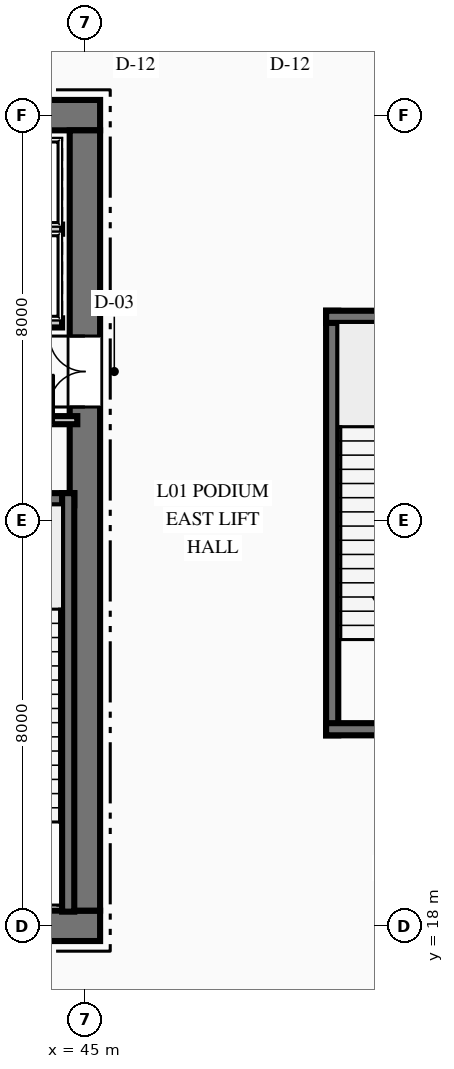
"""IFC4 building model, lengths in metres.
Left out: names, types, materials, properties, quantities, classifications, styles, units other than length and angle.
Written with IfcOpenShell. Run it as: python <this file> out.ifc"""

import sys

from ifc_helpers import new_model, si_unit, direction, frame, frame_2d, origin, place, context, subcontext, project, spatial, rectangle, extrude, element, fill, save


model = new_model("IFC4")
c1 = context("Model", 3, precision=1e-05, world=origin(), true_north=direction((0.0, 1.0)))
c2 = subcontext(c1, "Body", "Model", "MODEL_VIEW")
j1 = project(units=[si_unit("LENGTHUNIT", "METRE"), si_unit("PLANEANGLEUNIT", "RADIAN")], contexts=[c1])
p1 = place(None, origin())
s1 = spatial("IfcSite", under=j1, at=p1, CompositionType="ELEMENT")
p2 = place(p1, origin())
s2 = spatial("IfcBuilding", under=s1, at=p2, CompositionType="ELEMENT")
p3 = place(p2, frame((0.0, 0.0, 6.0)))
s3 = spatial("IfcBuildingStorey", under=s2, at=p3, CompositionType="ELEMENT", Elevation=6.0)
p4 = place(p3, frame((26.7, 18.0, 0.0), z_axis=(0.0, 0.0, 1.0), x_axis=(1.0, 0.0, 0.0)))
e1 = element("IfcWall", 1, at=p4, inside=s3, PredefinedType="SHEAR", context=c2, shape_type="SweptSolid", body=[
    extrude(rectangle(XDim=18.6, YDim=0.6, at=frame_2d((9.3, 0.0))), origin(), (0.0, 0.0, 1.0), 5.4),
])
p5 = place(p4, frame((7.4, 0.0, 0.0)))
e2 = element("IfcOpeningElement", 2, at=p5, cuts=e1, PredefinedType="OPENING", context=c2, shape_type="SweptSolid", body=[
    extrude(rectangle(XDim=1.1, YDim=2.15, at=frame_2d((0.55, 1.075))), frame((0.0, 0.31, 0.0), z_axis=(0.0, -1.0, 0.0), x_axis=(1.0, 0.0, 0.0)), (0.0, 0.0, 1.0), 0.62),
])
p6 = place(p4, frame((10.1, 0.0, 0.0)))
e3 = element("IfcOpeningElement", 3, at=p6, cuts=e1, PredefinedType="OPENING", context=c2, shape_type="SweptSolid", body=[
    extrude(rectangle(XDim=1.1, YDim=2.15, at=frame_2d((0.55, 1.075))), frame((0.0, 0.31, 0.0), z_axis=(0.0, -1.0, 0.0), x_axis=(1.0, 0.0, 0.0)), (0.0, 0.0, 1.0), 0.62),
])
p7 = place(p3, frame((26.7, 34.0, 0.0), z_axis=(0.0, 0.0, 1.0), x_axis=(1.0, 0.0, 0.0)))
e4 = element("IfcWall", 4, at=p7, inside=s3, PredefinedType="SHEAR", context=c2, shape_type="SweptSolid", body=[
    extrude(rectangle(XDim=18.6, YDim=0.6, at=frame_2d((9.3, 0.0))), origin(), (0.0, 0.0, 1.0), 5.4),
])
p8 = place(p7, frame((1.265, 0.0, 0.0)))
e5 = element("IfcOpeningElement", 5, at=p8, cuts=e4, PredefinedType="OPENING", context=c2, shape_type="SweptSolid", body=[
    extrude(rectangle(XDim=1.1, YDim=2.15, at=frame_2d((0.55, 1.075))), frame((0.0, 0.31, 0.0), z_axis=(0.0, -1.0, 0.0), x_axis=(1.0, 0.0, 0.0)), (0.0, 0.0, 1.0), 0.62),
])
p9 = place(p7, frame((3.515, 0.0, 0.0)))
e6 = element("IfcOpeningElement", 6, at=p9, cuts=e4, PredefinedType="OPENING", context=c2, shape_type="SweptSolid", body=[
    extrude(rectangle(XDim=1.1, YDim=2.15, at=frame_2d((0.55, 1.075))), frame((0.0, 0.31, 0.0), z_axis=(0.0, -1.0, 0.0), x_axis=(1.0, 0.0, 0.0)), (0.0, 0.0, 1.0), 0.62),
])
p10 = place(p7, frame((13.985, 0.0, 0.0)))
e7 = element("IfcOpeningElement", 7, at=p10, cuts=e4, PredefinedType="OPENING", context=c2, shape_type="SweptSolid", body=[
    extrude(rectangle(XDim=1.1, YDim=2.15, at=frame_2d((0.55, 1.075))), frame((0.0, 0.31, 0.0), z_axis=(0.0, -1.0, 0.0), x_axis=(1.0, 0.0, 0.0)), (0.0, 0.0, 1.0), 0.62),
])
p11 = place(p7, frame((16.235, 0.0, 0.0)))
e8 = element("IfcOpeningElement", 8, at=p11, cuts=e4, PredefinedType="OPENING", context=c2, shape_type="SweptSolid", body=[
    extrude(rectangle(XDim=1.1, YDim=2.15, at=frame_2d((0.55, 1.075))), frame((0.0, 0.31, 0.0), z_axis=(0.0, -1.0, 0.0), x_axis=(1.0, 0.0, 0.0)), (0.0, 0.0, 1.0), 0.62),
])
p12 = place(p3, frame((45.0, 18.3, 0.0), z_axis=(0.0, 0.0, 1.0), x_axis=(0.0, 1.0, 0.0)))
e9 = element("IfcWall", 9, at=p12, inside=s3, PredefinedType="SHEAR", context=c2, shape_type="SweptSolid", body=[
    extrude(rectangle(XDim=15.4, YDim=0.6, at=frame_2d((7.7, 0.0))), origin(), (0.0, 0.0, 1.0), 5.4),
])
p13 = place(p12, frame((9.94, 0.0, 0.0)))
e10 = element("IfcOpeningElement", 10, at=p13, cuts=e9, PredefinedType="OPENING", context=c2, shape_type="SweptSolid", body=[
    extrude(rectangle(XDim=1.4, YDim=2.2, at=frame_2d((0.7, 1.1))), frame((0.0, 0.31, 0.0), z_axis=(0.0, -1.0, 0.0), x_axis=(1.0, 0.0, 0.0)), (0.0, 0.0, 1.0), 0.62),
])
p14 = place(p3, frame((40.81, 26.42, 0.0), z_axis=(0.0, 0.0, 1.0), x_axis=(1.0, 0.0, 0.0)))
e11 = element("IfcWall", 11, at=p14, inside=s3, PredefinedType="SHEAR", context=c2, shape_type="SweptSolid", body=[
    extrude(rectangle(XDim=3.98, YDim=0.24, at=frame_2d((1.99, 0.0))), origin(), (0.0, 0.0, 1.0), 5.4),
])
p15 = place(p3, frame((44.67, 18.28, 0.0), z_axis=(0.0, 0.0, 1.0), x_axis=(0.0, 1.0, 0.0)))
e12 = element("IfcWall", 12, at=p15, inside=s3, PredefinedType="SHEAR", context=c2, shape_type="SweptSolid", body=[
    extrude(rectangle(XDim=8.26, YDim=0.24, at=frame_2d((4.13, 0.0))), origin(), (0.0, 0.0, 1.0), 5.4),
])
p16 = place(p3, frame((49.88, 21.76, 0.0), z_axis=(0.0, 0.0, 1.0), x_axis=(0.0, 1.0, 0.0)))
e13 = element("IfcWall", 13, at=p16, inside=s3, PredefinedType="SHEAR", context=c2, shape_type="SweptSolid", body=[
    extrude(rectangle(XDim=8.38, YDim=0.24, at=frame_2d((4.19, 0.0))), origin(), (0.0, 0.0, 1.0), 5.4),
])
p17 = place(p3, frame((49.76, 21.88, 0.0), z_axis=(0.0, 0.0, 1.0), x_axis=(1.0, 0.0, 0.0)))
e14 = element("IfcWall", 14, at=p17, inside=s3, PredefinedType="SHEAR", context=c2, shape_type="SweptSolid", body=[
    extrude(rectangle(XDim=3.98, YDim=0.24, at=frame_2d((1.99, 0.0))), origin(), (0.0, 0.0, 1.0), 5.4),
])
p18 = place(p17, frame((1.465, 0.0, 0.0)))
e15 = element("IfcOpeningElement", 15, at=p18, cuts=e14, PredefinedType="OPENING", context=c2, shape_type="SweptSolid", body=[
    extrude(rectangle(XDim=1.05, YDim=2.15, at=frame_2d((0.525, 1.075))), frame((0.0, 0.13, 0.0), z_axis=(0.0, -1.0, 0.0), x_axis=(1.0, 0.0, 0.0)), (0.0, 0.0, 1.0), 0.26),
])
p19 = place(p3, frame((49.76, 30.02, 0.0), z_axis=(0.0, 0.0, 1.0), x_axis=(1.0, 0.0, 0.0)))
e16 = element("IfcWall", 16, at=p19, inside=s3, PredefinedType="SHEAR", context=c2, shape_type="SweptSolid", body=[
    extrude(rectangle(XDim=3.98, YDim=0.24, at=frame_2d((1.99, 0.0))), origin(), (0.0, 0.0, 1.0), 5.4),
])
p20 = place(p3, frame((40.8, 27.98, 0.0), z_axis=(0.0, 0.0, 1.0), x_axis=(1.0, 0.0, 0.0)))
e17 = element("IfcWall", 17, at=p20, inside=s3, PredefinedType="PARTITIONING", context=c2, shape_type="SweptSolid", body=[
    extrude(rectangle(XDim=4.05, YDim=0.16, at=frame_2d((2.025, 0.0))), origin(), (0.0, 0.0, 1.0), 5.07),
])
p21 = place(p20, frame((0.77, 0.0, 0.0)))
e18 = element("IfcOpeningElement", 18, at=p21, cuts=e17, PredefinedType="OPENING", context=c2, shape_type="SweptSolid", body=[
    extrude(rectangle(XDim=0.9, YDim=2.15, at=frame_2d((0.45, 1.075))), frame((0.0, 0.09, 0.0), z_axis=(0.0, -1.0, 0.0), x_axis=(1.0, 0.0, 0.0)), (0.0, 0.0, 1.0), 0.18),
])
p22 = place(p20, frame((2.68, 0.0, 0.0)))
e19 = element("IfcOpeningElement", 19, at=p22, cuts=e17, PredefinedType="OPENING", context=c2, shape_type="SweptSolid", body=[
    extrude(rectangle(XDim=0.9, YDim=2.15, at=frame_2d((0.45, 1.075))), frame((0.0, 0.09, 0.0), z_axis=(0.0, -1.0, 0.0), x_axis=(1.0, 0.0, 0.0)), (0.0, 0.0, 1.0), 0.18),
])
p23 = place(p3, frame((40.12, 29.9, 0.0), z_axis=(0.0, 0.0, 1.0), x_axis=(1.0, 0.0, 0.0)))
e20 = element("IfcWall", 20, at=p23, inside=s3, PredefinedType="PARTITIONING", context=c2, shape_type="SweptSolid", body=[
    extrude(rectangle(XDim=4.43, YDim=0.18, at=frame_2d((2.215, 0.0))), origin(), (0.0, 0.0, 1.0), 5.07),
])
p24 = place(p23, frame((0.565, 0.0, 0.0)))
e21 = element("IfcOpeningElement", 21, at=p24, cuts=e20, PredefinedType="OPENING", context=c2, shape_type="SweptSolid", body=[
    extrude(rectangle(XDim=1.1, YDim=2.15, at=frame_2d((0.55, 1.075))), frame((0.0, 0.1, 0.0), z_axis=(0.0, -1.0, 0.0), x_axis=(1.0, 0.0, 0.0)), (0.0, 0.0, 1.0), 0.2),
])
p25 = place(p23, frame((2.815, 0.0, 0.0)))
e22 = element("IfcOpeningElement", 22, at=p25, cuts=e20, PredefinedType="OPENING", context=c2, shape_type="SweptSolid", body=[
    extrude(rectangle(XDim=1.1, YDim=2.15, at=frame_2d((0.55, 1.075))), frame((0.0, 0.1, 0.0), z_axis=(0.0, -1.0, 0.0), x_axis=(1.0, 0.0, 0.0)), (0.0, 0.0, 1.0), 0.2),
])
p26 = place(p3, frame((40.12, 31.75, 0.0), z_axis=(0.0, 0.0, 1.0), x_axis=(1.0, 0.0, 0.0)))
e23 = element("IfcWall", 23, at=p26, inside=s3, PredefinedType="PARTITIONING", context=c2, shape_type="SweptSolid", body=[
    extrude(rectangle(XDim=4.43, YDim=0.18, at=frame_2d((2.215, 0.0))), origin(), (0.0, 0.0, 1.0), 5.07),
])
p27 = place(p22, origin())
e24 = element("IfcDoor", 24, at=p27, inside=s3, OperationType="SINGLE_SWING_RIGHT", PredefinedType="DOOR", context=c2, shape_type="SweptSolid", body=[
    extrude(rectangle(XDim=0.9, YDim=2.15, at=frame_2d((0.45, 1.075))), frame((0.0, 0.025, 0.0), z_axis=(0.0, -1.0, 0.0), x_axis=(1.0, 0.0, 0.0)), (0.0, 0.0, 1.0), 0.05),
])
fill(e19, e24)
p28 = place(p13, origin())
e25 = element("IfcDoor", 25, at=p28, inside=s3, OperationType="DOUBLE_DOOR_SINGLE_SWING", PredefinedType="DOOR", context=c2, shape_type="SweptSolid", body=[
    extrude(rectangle(XDim=1.4, YDim=2.2, at=frame_2d((0.7, 1.1))), frame((0.0, 0.025, 0.0), z_axis=(0.0, -1.0, 0.0), x_axis=(1.0, 0.0, 0.0)), (0.0, 0.0, 1.0), 0.05),
])
fill(e10, e25)
save(model, sys.argv[1])
